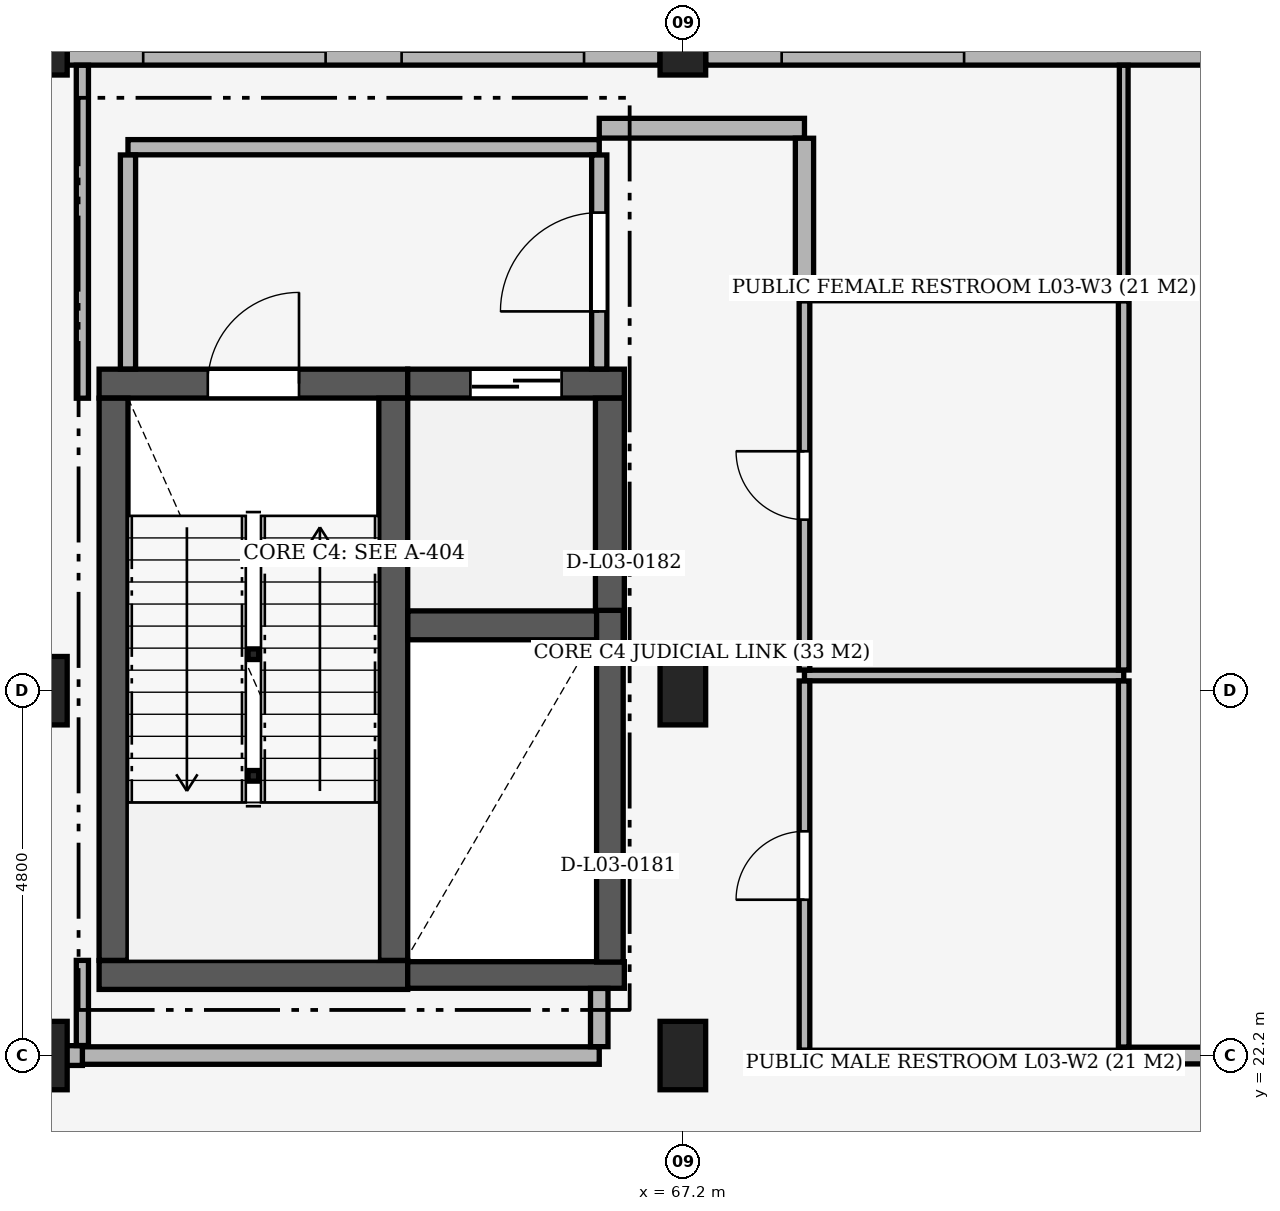
"""IFC4 building model, lengths in metres.
Left out: names, types, materials, properties, quantities, classifications, styles, units other than length and angle.
Written with IfcOpenShell. Run it as: python <this file> out.ifc"""

import sys

from ifc_helpers import new_model, si_unit, direction, frame, frame_2d, origin, origin_2d, place, context, subcontext, project, spatial, rectangle, hollow_circle, extrude, element, fill, save


model = new_model("IFC4")
c1 = context("Model", 3, precision=1e-05, world=origin(), true_north=direction((0.0, 1.0)))
c2 = subcontext(c1, "Body", "Model", "MODEL_VIEW")
j1 = project(units=[si_unit("LENGTHUNIT", "METRE"), si_unit("PLANEANGLEUNIT", "RADIAN")], contexts=[c1])
p1 = place(None, origin())
s1 = spatial("IfcSite", under=j1, at=p1, CompositionType="ELEMENT")
p2 = place(p1, origin())
s2 = spatial("IfcBuilding", under=s1, at=p2, CompositionType="ELEMENT")
p3 = place(p2, frame((0.0, 0.0, 15.3)))
s3 = spatial("IfcBuildingStorey", under=s2, at=p3, CompositionType="ELEMENT", Elevation=15.3)
for number, where, z_axis, x_axis in (
    (1, (58.8, 22.2, 0.0), (0.0, 0.0, 1.0), (1.0, 0.0, 0.0)),
    (2, (58.8, 27.0, 0.0), (0.0, 0.0, 1.0), (1.0, 0.0, 0.0)),
):
    element("IfcColumn", number, at=place(p3, frame(where, z_axis=z_axis, x_axis=x_axis)), inside=s3, PredefinedType="COLUMN", context=c2, shape_type="SweptSolid", body=[
        extrude(rectangle(XDim=0.6, YDim=0.9, at=origin_2d()), origin(), (0.0, 0.0, 1.0), 5.1),
    ])
p4 = place(p3, frame((58.8, 35.4, 0.0), z_axis=(0.0, 0.0, 1.0), x_axis=(1.0, 0.0, 0.0)))
e3 = element("IfcColumn", 3, at=p4, inside=s3, PredefinedType="COLUMN", context=c2, shape_type="SweptSolid", body=[
    extrude(rectangle(XDim=0.6, YDim=0.6, at=origin_2d()), origin(), (0.0, 0.0, 1.0), 5.1),
])
for number, where, z_axis, x_axis in (
    (4, (67.2, 22.2, 0.0), (0.0, 0.0, 1.0), (1.0, 0.0, 0.0)),
    (5, (67.2, 27.0, 0.0), (0.0, 0.0, 1.0), (1.0, 0.0, 0.0)),
):
    element("IfcColumn", number, at=place(p3, frame(where, z_axis=z_axis, x_axis=x_axis)), inside=s3, PredefinedType="COLUMN", context=c2, shape_type="SweptSolid", body=[
        extrude(rectangle(XDim=0.6, YDim=0.9, at=origin_2d()), origin(), (0.0, 0.0, 1.0), 5.1),
    ])
p5 = place(p3, frame((67.2, 35.4, 0.0), z_axis=(0.0, 0.0, 1.0), x_axis=(1.0, 0.0, 0.0)))
e6 = element("IfcColumn", 6, at=p5, inside=s3, PredefinedType="COLUMN", context=c2, shape_type="SweptSolid", body=[
    extrude(rectangle(XDim=0.6, YDim=0.6, at=origin_2d()), origin(), (0.0, 0.0, 1.0), 5.1),
])
for number, where, z_axis, x_axis in (
    (7, (61.55, 25.88, -2.98), (0.0, 0.0, 1.0), (1.0, 0.0, 0.0)),
    (8, (61.55, 27.48, -2.98), (0.0, 0.0, 1.0), (1.0, 0.0, 0.0)),
):
    element("IfcColumn", number, at=place(p3, frame(where, z_axis=z_axis, x_axis=x_axis)), inside=s3, PredefinedType="COLUMN", context=c2, shape_type="SweptSolid", body=[
        extrude(hollow_circle(Radius=0.07, WallThickness=0.008, at=origin_2d()), origin(), (0.0, 0.0, 1.0), 5.1),
    ])
p6 = place(p3, frame((59.1, 35.4, 0.0), z_axis=(0.0, 0.0, 1.0), x_axis=(1.0, 0.0, 0.0)))
e9 = element("IfcWall", 9, at=p6, inside=s3, PredefinedType="SOLIDWALL", context=c2, shape_type="SweptSolid", body=[
    extrude(rectangle(XDim=7.8, YDim=0.34, at=frame_2d((3.9, 0.0))), origin(), (0.0, 0.0, 1.0), 4.14),
])
p7 = place(p6, frame((1.0, 0.0, 0.85)))
e10 = element("IfcOpeningElement", 10, at=p7, cuts=e9, PredefinedType="OPENING", context=c2, shape_type="SweptSolid", body=[
    extrude(rectangle(XDim=2.4, YDim=2.4, at=frame_2d((1.2, 1.2))), frame((0.0, 0.185, 0.0), z_axis=(0.0, -1.0, 0.0), x_axis=(1.0, 0.0, 0.0)), (0.0, 0.0, 1.0), 0.37),
])
p8 = place(p6, frame((4.4, 0.0, 0.85)))
e11 = element("IfcOpeningElement", 11, at=p8, cuts=e9, PredefinedType="OPENING", context=c2, shape_type="SweptSolid", body=[
    extrude(rectangle(XDim=2.4, YDim=2.4, at=frame_2d((1.2, 1.2))), frame((0.0, 0.185, 0.0), z_axis=(0.0, -1.0, 0.0), x_axis=(1.0, 0.0, 0.0)), (0.0, 0.0, 1.0), 0.37),
])
p9 = place(p3, frame((67.5, 35.4, 0.0), z_axis=(0.0, 0.0, 1.0), x_axis=(1.0, 0.0, 0.0)))
e12 = element("IfcWall", 12, at=p9, inside=s3, PredefinedType="SOLIDWALL", context=c2, shape_type="SweptSolid", body=[
    extrude(rectangle(XDim=7.8, YDim=0.34, at=frame_2d((3.9, 0.0))), origin(), (0.0, 0.0, 1.0), 4.14),
])
p10 = place(p9, frame((1.0, 0.0, 0.85)))
e13 = element("IfcOpeningElement", 13, at=p10, cuts=e12, PredefinedType="OPENING", context=c2, shape_type="SweptSolid", body=[
    extrude(rectangle(XDim=2.4, YDim=2.4, at=frame_2d((1.2, 1.2))), frame((0.0, 0.185, 0.0), z_axis=(0.0, -1.0, 0.0), x_axis=(1.0, 0.0, 0.0)), (0.0, 0.0, 1.0), 0.37),
])
p11 = place(p3, frame((59.52, 31.04, 0.0), z_axis=(0.0, 0.0, 1.0), x_axis=(1.0, 0.0, 0.0)))
e14 = element("IfcWall", 14, at=p11, inside=s3, PredefinedType="SHEAR", context=c2, shape_type="SweptSolid", body=[
    extrude(rectangle(XDim=4.06, YDim=0.38, at=frame_2d((2.03, 0.0))), origin(), (0.0, 0.0, 1.0), 4.84),
])
p12 = place(p11, frame((1.43, 0.0, 0.0)))
e15 = element("IfcOpeningElement", 15, at=p12, cuts=e14, PredefinedType="OPENING", context=c2, shape_type="SweptSolid", body=[
    extrude(rectangle(XDim=1.2, YDim=2.2, at=frame_2d((0.6, 1.1))), frame((0.0, 0.205, 0.0), z_axis=(0.0, -1.0, 0.0), x_axis=(1.0, 0.0, 0.0)), (0.0, 0.0, 1.0), 0.41),
])
p13 = place(p3, frame((59.52, 23.26, 0.0), z_axis=(0.0, 0.0, 1.0), x_axis=(1.0, 0.0, 0.0)))
e16 = element("IfcWall", 16, at=p13, inside=s3, PredefinedType="SHEAR", context=c2, shape_type="SweptSolid", body=[
    extrude(rectangle(XDim=4.06, YDim=0.38, at=frame_2d((2.03, 0.0))), origin(), (0.0, 0.0, 1.0), 4.84),
])
for number, where, z_axis, x_axis in (
    (17, (59.71, 23.452, 0.0), (0.0, 0.0, 1.0), (0.0, 1.0, 0.0)),
    (18, (63.39, 23.452, 0.0), (0.0, 0.0, 1.0), (0.0, 1.0, 0.0)),
):
    element("IfcWall", number, at=place(p3, frame(where, z_axis=z_axis, x_axis=x_axis)), inside=s3, PredefinedType="SHEAR", context=c2, shape_type="SweptSolid", body=[
        extrude(rectangle(XDim=7.396, YDim=0.38, at=frame_2d((3.698, 0.0))), origin(), (0.0, 0.0, 1.0), 4.84),
    ])
p14 = place(p3, frame((63.582, 27.86, 0.0), z_axis=(0.0, 0.0, 1.0), x_axis=(1.0, 0.0, 0.0)))
e19 = element("IfcWall", 19, at=p14, inside=s3, PredefinedType="SHEAR", context=c2, shape_type="SweptSolid", body=[
    extrude(rectangle(XDim=2.848, YDim=0.38, at=frame_2d((1.424, 0.0))), origin(), (0.0, 0.0, 1.0), 4.84),
])
p15 = place(p3, frame((63.58, 31.04, 0.0), z_axis=(0.0, 0.0, 1.0), x_axis=(1.0, 0.0, 0.0)))
e20 = element("IfcWall", 20, at=p15, inside=s3, PredefinedType="SHEAR", context=c2, shape_type="SweptSolid", body=[
    extrude(rectangle(XDim=2.85, YDim=0.38, at=frame_2d((1.425, 0.0))), origin(), (0.0, 0.0, 1.0), 4.84),
])
p16 = place(p15, frame((0.825, 0.0, 0.0)))
e21 = element("IfcOpeningElement", 21, at=p16, cuts=e20, PredefinedType="OPENING", context=c2, shape_type="SweptSolid", body=[
    extrude(rectangle(XDim=1.2, YDim=2.15, at=frame_2d((0.6, 1.075))), frame((0.0, 0.205, 0.0), z_axis=(0.0, -1.0, 0.0), x_axis=(1.0, 0.0, 0.0)), (0.0, 0.0, 1.0), 0.41),
])
p17 = place(p3, frame((66.24, 28.052, 0.0), z_axis=(0.0, 0.0, 1.0), x_axis=(0.0, 1.0, 0.0)))
e22 = element("IfcWall", 22, at=p17, inside=s3, PredefinedType="SHEAR", context=c2, shape_type="SweptSolid", body=[
    extrude(rectangle(XDim=2.796, YDim=0.38, at=frame_2d((1.398, 0.0))), origin(), (0.0, 0.0, 1.0), 4.84),
])
p18 = place(p3, frame((63.58, 23.26, 0.0), z_axis=(0.0, 0.0, 1.0), x_axis=(1.0, 0.0, 0.0)))
e23 = element("IfcWall", 23, at=p18, inside=s3, PredefinedType="SHEAR", context=c2, shape_type="SweptSolid", body=[
    extrude(rectangle(XDim=2.85, YDim=0.35, at=frame_2d((1.425, 0.0))), origin(), (0.0, 0.0, 1.0), 4.84),
])
p19 = place(p3, frame((66.24, 23.43, 0.0), z_axis=(0.0, 0.0, 1.0), x_axis=(0.0, 1.0, 0.0)))
e24 = element("IfcWall", 24, at=p19, inside=s3, PredefinedType="SHEAR", context=c2, shape_type="SweptSolid", body=[
    extrude(rectangle(XDim=4.627, YDim=0.35, at=frame_2d((2.313, 0.0))), origin(), (0.0, 0.0, 1.0), 4.84),
])
p20 = place(p3, frame((59.3, 22.2, 0.0), z_axis=(0.0, 0.0, 1.0), x_axis=(1.0, 0.0, 0.0)))
e25 = element("IfcWall", 25, at=p20, inside=s3, PredefinedType="SOLIDWALL", context=c2, shape_type="SweptSolid", body=[
    extrude(rectangle(XDim=6.8, YDim=0.23, at=frame_2d((3.4, 0.0))), origin(), (0.0, 0.0, 1.0), 4.14),
])
p21 = place(p3, frame((38.6, 22.2, 0.0), z_axis=(0.0, 0.0, 1.0), x_axis=(1.0, 0.0, 0.0)))
e26 = element("IfcWall", 26, at=p21, inside=s3, PredefinedType="PARTITIONING", context=c2, shape_type="SweptSolid", body=[
    extrude(rectangle(XDim=20.7, YDim=0.26, at=frame_2d((10.35, 0.0))), origin(), (0.0, 0.0, 1.0), 4.14),
])
p22 = place(p21, frame((9.325, 0.0, 0.0)))
e27 = element("IfcOpeningElement", 27, at=p22, cuts=e26, PredefinedType="OPENING", context=c2, shape_type="SweptSolid", body=[
    extrude(rectangle(XDim=1.15, YDim=2.15, at=frame_2d((0.575, 1.075))), frame((0.0, 0.145, 0.0), z_axis=(0.0, -1.0, 0.0), x_axis=(1.0, 0.0, 0.0)), (0.0, 0.0, 1.0), 0.29),
])
p23 = place(p3, frame((68.8, 22.2, 0.0), z_axis=(0.0, 0.0, 1.0), x_axis=(1.0, 0.0, 0.0)))
e28 = element("IfcWall", 28, at=p23, inside=s3, PredefinedType="PARTITIONING", context=c2, shape_type="SweptSolid", body=[
    extrude(rectangle(XDim=4.2, YDim=0.14, at=frame_2d((2.1, 0.0))), origin(), (0.0, 0.0, 1.0), 4.14),
])
p24 = place(p3, frame((73.0, 22.2, 0.0), z_axis=(0.0, 0.0, 1.0), x_axis=(1.0, 0.0, 0.0)))
e29 = element("IfcWall", 29, at=p24, inside=s3, PredefinedType="PARTITIONING", context=c2, shape_type="SweptSolid", body=[
    extrude(rectangle(XDim=19.437, YDim=0.22, at=frame_2d((9.719, 0.0))), origin(), (0.0, 0.0, 1.0), 4.14),
])
p25 = place(p24, frame((8.768, 0.0, 0.0)))
e30 = element("IfcOpeningElement", 30, at=p25, cuts=e29, PredefinedType="OPENING", context=c2, shape_type="SweptSolid", body=[
    extrude(rectangle(XDim=1.0, YDim=2.2, at=frame_2d((0.5, 1.1))), frame((0.0, 0.125, 0.0), z_axis=(0.0, -1.0, 0.0), x_axis=(1.0, 0.0, 0.0)), (0.0, 0.0, 1.0), 0.25),
])
p26 = place(p3, frame((68.8, 27.2, 0.0), z_axis=(0.0, 0.0, 1.0), x_axis=(1.0, 0.0, 0.0)))
e31 = element("IfcWall", 31, at=p26, inside=s3, PredefinedType="PARTITIONING", context=c2, shape_type="SweptSolid", body=[
    extrude(rectangle(XDim=4.2, YDim=0.14, at=frame_2d((2.1, 0.0))), origin(), (0.0, 0.0, 1.0), 4.14),
])
p27 = place(p3, frame((68.8, 32.2, 0.0), z_axis=(0.0, 0.0, 1.0), x_axis=(1.0, 0.0, 0.0)))
e32 = element("IfcWall", 32, at=p27, inside=s3, PredefinedType="PARTITIONING", context=c2, shape_type="SweptSolid", body=[
    extrude(rectangle(XDim=4.2, YDim=0.14, at=frame_2d((2.1, 0.0))), origin(), (0.0, 0.0, 1.0), 4.84),
])
p28 = place(p3, frame((59.9, 34.15, 0.0), z_axis=(0.0, 0.0, 1.0), x_axis=(1.0, 0.0, 0.0)))
e33 = element("IfcWall", 33, at=p28, inside=s3, PredefinedType="PARTITIONING", context=c2, shape_type="SweptSolid", body=[
    extrude(rectangle(XDim=6.2, YDim=0.2, at=frame_2d((3.1, 0.0))), origin(), (0.0, 0.0, 1.0), 4.84),
])
p29 = place(p3, frame((66.1, 34.4, 0.0), z_axis=(0.0, 0.0, 1.0), x_axis=(1.0, 0.0, 0.0)))
e34 = element("IfcWall", 34, at=p29, inside=s3, PredefinedType="PARTITIONING", context=c2, shape_type="SweptSolid", body=[
    extrude(rectangle(XDim=2.7, YDim=0.26, at=frame_2d((1.35, 0.0))), origin(), (0.0, 0.0, 1.0), 4.14),
])
p30 = place(p3, frame((59.3, 22.332, 0.0), z_axis=(0.0, 0.0, 1.0), x_axis=(0.0, 1.0, 0.0)))
e35 = element("IfcWall", 35, at=p30, inside=s3, PredefinedType="PARTITIONING", context=c2, shape_type="SweptSolid", body=[
    extrude(rectangle(XDim=1.12, YDim=0.16, at=frame_2d((0.56, 0.0))), origin(), (0.0, 0.0, 1.0), 4.14),
])
p31 = place(p3, frame((59.3, 30.848, 0.0), z_axis=(0.0, 0.0, 1.0), x_axis=(0.0, 1.0, 0.0)))
e36 = element("IfcWall", 36, at=p31, inside=s3, PredefinedType="PARTITIONING", context=c2, shape_type="SweptSolid", body=[
    extrude(rectangle(XDim=4.38, YDim=0.16, at=frame_2d((2.19, 0.0))), origin(), (0.0, 0.0, 1.0), 4.14),
])
p32 = place(p3, frame((59.9, 31.232, 0.0), z_axis=(0.0, 0.0, 1.0), x_axis=(0.0, 1.0, 0.0)))
e37 = element("IfcWall", 37, at=p32, inside=s3, PredefinedType="PARTITIONING", context=c2, shape_type="SweptSolid", body=[
    extrude(rectangle(XDim=2.816, YDim=0.2, at=frame_2d((1.408, 0.0))), origin(), (0.0, 0.0, 1.0), 4.54),
])
p33 = place(p3, frame((66.1, 31.232, 0.0), z_axis=(0.0, 0.0, 1.0), x_axis=(0.0, 1.0, 0.0)))
e38 = element("IfcWall", 38, at=p33, inside=s3, PredefinedType="PARTITIONING", context=c2, shape_type="SweptSolid", body=[
    extrude(rectangle(XDim=2.816, YDim=0.2, at=frame_2d((1.408, 0.0))), origin(), (0.0, 0.0, 1.0), 4.54),
])
p34 = place(p33, frame((0.758, 0.0, 0.0)))
e39 = element("IfcOpeningElement", 39, at=p34, cuts=e38, PredefinedType="OPENING", context=c2, shape_type="SweptSolid", body=[
    extrude(rectangle(XDim=1.3, YDim=2.2, at=frame_2d((0.65, 1.1))), frame((0.0, 0.115, 0.0), z_axis=(0.0, -1.0, 0.0), x_axis=(1.0, 0.0, 0.0)), (0.0, 0.0, 1.0), 0.23),
])
p35 = place(p3, frame((66.1, 22.317, 0.0), z_axis=(0.0, 0.0, 1.0), x_axis=(0.0, 1.0, 0.0)))
e40 = element("IfcWall", 40, at=p35, inside=s3, PredefinedType="SOLIDWALL", context=c2, shape_type="SweptSolid", body=[
    extrude(rectangle(XDim=0.766, YDim=0.23, at=frame_2d((0.383, 0.0))), origin(), (0.0, 0.0, 1.0), 4.14),
])
p36 = place(p3, frame((68.8, 32.272, 0.0), z_axis=(0.0, 0.0, 1.0), x_axis=(0.0, 1.0, 0.0)))
e41 = element("IfcWall", 41, at=p36, inside=s3, PredefinedType="PARTITIONING", context=c2, shape_type="SweptSolid", body=[
    extrude(rectangle(XDim=1.996, YDim=0.24, at=frame_2d((0.998, 0.0))), origin(), (0.0, 0.0, 1.0), 4.84),
])
p37 = place(p3, frame((68.8, 22.272, 0.0), z_axis=(0.0, 0.0, 1.0), x_axis=(0.0, 1.0, 0.0)))
e42 = element("IfcWall", 42, at=p37, inside=s3, PredefinedType="PARTITIONING", context=c2, shape_type="SweptSolid", body=[
    extrude(rectangle(XDim=4.856, YDim=0.14, at=frame_2d((2.428, 0.0))), origin(), (0.0, 0.0, 1.0), 4.14),
])
p38 = place(p37, frame((1.978, 0.0, 0.0)))
e43 = element("IfcOpeningElement", 43, at=p38, cuts=e42, PredefinedType="OPENING", context=c2, shape_type="SweptSolid", body=[
    extrude(rectangle(XDim=0.9, YDim=2.1, at=frame_2d((0.45, 1.05))), frame((0.0, 0.085, 0.0), z_axis=(0.0, -1.0, 0.0), x_axis=(1.0, 0.0, 0.0)), (0.0, 0.0, 1.0), 0.17),
])
p39 = place(p3, frame((68.8, 27.272, 0.0), z_axis=(0.0, 0.0, 1.0), x_axis=(0.0, 1.0, 0.0)))
e44 = element("IfcWall", 44, at=p39, inside=s3, PredefinedType="PARTITIONING", context=c2, shape_type="SweptSolid", body=[
    extrude(rectangle(XDim=4.856, YDim=0.14, at=frame_2d((2.428, 0.0))), origin(), (0.0, 0.0, 1.0), 4.14),
])
p40 = place(p39, frame((1.978, 0.0, 0.0)))
e45 = element("IfcOpeningElement", 45, at=p40, cuts=e44, PredefinedType="OPENING", context=c2, shape_type="SweptSolid", body=[
    extrude(rectangle(XDim=0.9, YDim=2.1, at=frame_2d((0.45, 1.05))), frame((0.0, 0.085, 0.0), z_axis=(0.0, -1.0, 0.0), x_axis=(1.0, 0.0, 0.0)), (0.0, 0.0, 1.0), 0.17),
])
p41 = place(p3, frame((73.0, 22.312, 0.0), z_axis=(0.0, 0.0, 1.0), x_axis=(0.0, 1.0, 0.0)))
e46 = element("IfcWall", 46, at=p41, inside=s3, PredefinedType="PARTITIONING", context=c2, shape_type="SweptSolid", body=[
    extrude(rectangle(XDim=4.816, YDim=0.14, at=frame_2d((2.408, 0.0))), origin(), (0.0, 0.0, 1.0), 4.14),
])
p42 = place(p3, frame((73.0, 27.272, 0.0), z_axis=(0.0, 0.0, 1.0), x_axis=(0.0, 1.0, 0.0)))
e47 = element("IfcWall", 47, at=p42, inside=s3, PredefinedType="PARTITIONING", context=c2, shape_type="SweptSolid", body=[
    extrude(rectangle(XDim=4.856, YDim=0.14, at=frame_2d((2.428, 0.0))), origin(), (0.0, 0.0, 1.0), 4.14),
])
p43 = place(p3, frame((73.0, 32.272, 0.0), z_axis=(0.0, 0.0, 1.0), x_axis=(0.0, 1.0, 0.0)))
e48 = element("IfcWall", 48, at=p43, inside=s3, PredefinedType="PARTITIONING", context=c2, shape_type="SweptSolid", body=[
    extrude(rectangle(XDim=2.956, YDim=0.115, at=frame_2d((1.478, 0.0))), origin(), (0.0, 0.0, 1.0), 4.14),
])
p44 = place(p7, origin())
e49 = element("IfcWindow", 49, at=p44, inside=s3, PartitioningType="SINGLE_PANEL", PredefinedType="WINDOW", context=c2, shape_type="SweptSolid", body=[
    extrude(rectangle(XDim=2.4, YDim=2.4, at=frame_2d((1.2, 1.2))), frame((0.0, 0.03, 0.0), z_axis=(0.0, -1.0, 0.0), x_axis=(1.0, 0.0, 0.0)), (0.0, 0.0, 1.0), 0.06),
])
fill(e10, e49)
p45 = place(p8, origin())
e50 = element("IfcWindow", 50, at=p45, inside=s3, PartitioningType="SINGLE_PANEL", PredefinedType="WINDOW", context=c2, shape_type="SweptSolid", body=[
    extrude(rectangle(XDim=2.4, YDim=2.4, at=frame_2d((1.2, 1.2))), frame((0.0, 0.03, 0.0), z_axis=(0.0, -1.0, 0.0), x_axis=(1.0, 0.0, 0.0)), (0.0, 0.0, 1.0), 0.06),
])
fill(e11, e50)
p46 = place(p10, origin())
e51 = element("IfcWindow", 51, at=p46, inside=s3, PartitioningType="SINGLE_PANEL", PredefinedType="WINDOW", context=c2, shape_type="SweptSolid", body=[
    extrude(rectangle(XDim=2.4, YDim=2.4, at=frame_2d((1.2, 1.2))), frame((0.0, 0.03, 0.0), z_axis=(0.0, -1.0, 0.0), x_axis=(1.0, 0.0, 0.0)), (0.0, 0.0, 1.0), 0.06),
])
fill(e13, e51)
p47 = place(p12, origin())
e52 = element("IfcDoor", 52, at=p47, inside=s3, OperationType="SINGLE_SWING_RIGHT", PredefinedType="DOOR", context=c2, shape_type="SweptSolid", body=[
    extrude(rectangle(XDim=1.2, YDim=2.2, at=frame_2d((0.6, 1.1))), frame((0.0, 0.025, 0.0), z_axis=(0.0, -1.0, 0.0), x_axis=(1.0, 0.0, 0.0)), (0.0, 0.0, 1.0), 0.05),
])
fill(e15, e52)
p48 = place(p16, origin())
e53 = element("IfcDoor", 53, at=p48, inside=s3, OperationType="DOUBLE_DOOR_SLIDING", PredefinedType="DOOR", context=c2, shape_type="SweptSolid", body=[
    extrude(rectangle(XDim=1.2, YDim=2.15, at=frame_2d((0.6, 1.075))), frame((0.0, 0.025, 0.0), z_axis=(0.0, -1.0, 0.0), x_axis=(1.0, 0.0, 0.0)), (0.0, 0.0, 1.0), 0.05),
])
fill(e21, e53)
p49 = place(p34, origin())
e54 = element("IfcDoor", 54, at=p49, inside=s3, OperationType="SINGLE_SWING_LEFT", PredefinedType="DOOR", context=c2, shape_type="SweptSolid", body=[
    extrude(rectangle(XDim=1.3, YDim=2.2, at=frame_2d((0.65, 1.1))), frame((0.0, 0.025, 0.0), z_axis=(0.0, -1.0, 0.0), x_axis=(1.0, 0.0, 0.0)), (0.0, 0.0, 1.0), 0.05),
])
fill(e39, e54)
p50 = place(p38, origin())
e55 = element("IfcDoor", 55, at=p50, inside=s3, OperationType="SINGLE_SWING_LEFT", PredefinedType="DOOR", context=c2, shape_type="SweptSolid", body=[
    extrude(rectangle(XDim=0.9, YDim=2.1, at=frame_2d((0.45, 1.05))), frame((0.0, 0.025, 0.0), z_axis=(0.0, -1.0, 0.0), x_axis=(1.0, 0.0, 0.0)), (0.0, 0.0, 1.0), 0.05),
])
fill(e43, e55)
p51 = place(p40, origin())
e56 = element("IfcDoor", 56, at=p51, inside=s3, OperationType="SINGLE_SWING_RIGHT", PredefinedType="DOOR", context=c2, shape_type="SweptSolid", body=[
    extrude(rectangle(XDim=0.9, YDim=2.1, at=frame_2d((0.45, 1.05))), frame((0.0, 0.025, 0.0), z_axis=(0.0, -1.0, 0.0), x_axis=(1.0, 0.0, 0.0)), (0.0, 0.0, 1.0), 0.05),
])
fill(e45, e56)
save(model, sys.argv[1])
